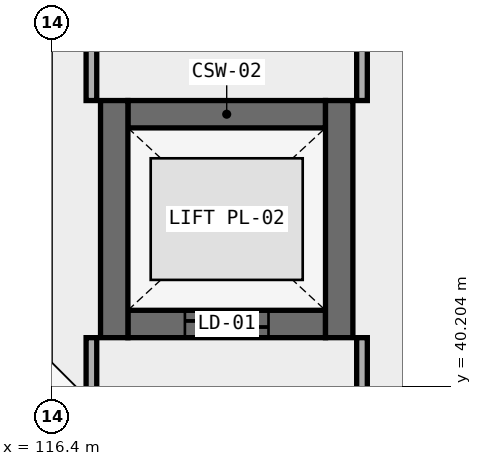
"""IFC4 building model, lengths in metres.
Left out: names, types, materials, properties, quantities, classifications, styles, units other than length and angle.
Written with IfcOpenShell. Run it as: python <this file> out.ifc"""

import sys

from ifc_helpers import new_model, si_unit, direction, frame, frame_2d, origin, place, context, subcontext, project, spatial, rectangle, extrude, element, fill, save


model = new_model("IFC4")
c1 = context("Model", 3, precision=1e-05, world=origin(), true_north=direction((0.0, 1.0)))
c2 = subcontext(c1, "Body", "Model", "MODEL_VIEW")
j1 = project(units=[si_unit("LENGTHUNIT", "METRE"), si_unit("PLANEANGLEUNIT", "RADIAN")], contexts=[c1])
p1 = place(None, origin())
s1 = spatial("IfcSite", under=j1, at=p1, CompositionType="ELEMENT")
p2 = place(p1, origin())
s2 = spatial("IfcBuilding", under=s1, at=p2, CompositionType="ELEMENT")
p3 = place(p2, frame((0.0, 0.0, 21.3)))
s3 = spatial("IfcBuildingStorey", under=s2, at=p3, CompositionType="ELEMENT", Elevation=21.3)
p4 = place(p3, frame((117.4, 43.78, 0.0), z_axis=(0.0, 0.0, 1.0), x_axis=(1.0, 0.0, 0.0)))
e1 = element("IfcWall", 1, at=p4, inside=s3, PredefinedType="SHEAR", context=c2, shape_type="SweptSolid", body=[
    extrude(rectangle(XDim=2.6, YDim=0.36, at=frame_2d((1.3, 0.0))), origin(), (0.0, 0.0, 1.0), 3.95),
])
p5 = place(p3, frame((117.4, 41.02, 0.0), z_axis=(0.0, 0.0, 1.0), x_axis=(1.0, 0.0, 0.0)))
e2 = element("IfcWall", 2, at=p5, inside=s3, PredefinedType="SHEAR", context=c2, shape_type="SweptSolid", body=[
    extrude(rectangle(XDim=2.6, YDim=0.36, at=frame_2d((1.3, 0.0))), origin(), (0.0, 0.0, 1.0), 3.95),
])
p6 = place(p5, frame((0.75, 0.0, 0.0)))
e3 = element("IfcOpeningElement", 3, at=p6, cuts=e2, PredefinedType="OPENING", context=c2, shape_type="SweptSolid", body=[
    extrude(rectangle(XDim=1.1, YDim=2.15, at=frame_2d((0.55, 1.075))), frame((0.0, 0.195, 0.0), z_axis=(0.0, -1.0, 0.0), x_axis=(1.0, 0.0, 0.0)), (0.0, 0.0, 1.0), 0.39),
])
for number, where, z_axis, x_axis in (
    (4, (117.22, 40.84, 0.0), (0.0, 0.0, 1.0), (0.0, 1.0, 0.0)),
    (5, (120.18, 40.84, 0.0), (0.0, 0.0, 1.0), (0.0, 1.0, 0.0)),
):
    element("IfcWall", number, at=place(p3, frame(where, z_axis=z_axis, x_axis=x_axis)), inside=s3, PredefinedType="SHEAR", context=c2, shape_type="SweptSolid", body=[
        extrude(rectangle(XDim=3.12, YDim=0.36, at=frame_2d((1.56, 0.0))), origin(), (0.0, 0.0, 1.0), 3.95),
    ])
p7 = place(p3, frame((116.92, 39.975, 0.0), z_axis=(0.0, 0.0, 1.0), x_axis=(0.0, 1.0, 0.0)))
e6 = element("IfcWall", 6, at=p7, inside=s3, PredefinedType="PARTITIONING", context=c2, shape_type="SweptSolid", body=[
    extrude(rectangle(XDim=0.865, YDim=0.14, at=frame_2d((0.433, 0.0))), origin(), (0.0, 0.0, 1.0), 2.83),
])
p8 = place(p3, frame((116.92, 43.96, 0.0), z_axis=(0.0, 0.0, 1.0), x_axis=(0.0, 1.0, 0.0)))
e7 = element("IfcWall", 7, at=p8, inside=s3, PredefinedType="PARTITIONING", context=c2, shape_type="SweptSolid", body=[
    extrude(rectangle(XDim=1.85, YDim=0.14, at=frame_2d((0.925, 0.0))), origin(), (0.0, 0.0, 1.0), 2.83),
])
p9 = place(p3, frame((120.48, 38.52, 0.0), z_axis=(0.0, 0.0, 1.0), x_axis=(0.0, 1.0, 0.0)))
e8 = element("IfcWall", 8, at=p9, inside=s3, PredefinedType="PARTITIONING", context=c2, shape_type="SweptSolid", body=[
    extrude(rectangle(XDim=2.32, YDim=0.14, at=frame_2d((1.16, 0.0))), origin(), (0.0, 0.0, 1.0), 2.83),
])
p10 = place(p3, frame((120.48, 43.96, 0.0), z_axis=(0.0, 0.0, 1.0), x_axis=(0.0, 1.0, 0.0)))
e9 = element("IfcWall", 9, at=p10, inside=s3, PredefinedType="PARTITIONING", context=c2, shape_type="SweptSolid", body=[
    extrude(rectangle(XDim=1.85, YDim=0.14, at=frame_2d((0.925, 0.0))), origin(), (0.0, 0.0, 1.0), 2.83),
])
p11 = place(p6, origin())
e10 = element("IfcDoor", 10, at=p11, inside=s3, OperationType="DOUBLE_DOOR_SLIDING", PredefinedType="DOOR", context=c2, shape_type="SweptSolid", body=[
    extrude(rectangle(XDim=1.1, YDim=2.15, at=frame_2d((0.55, 1.075))), frame((0.0, 0.025, 0.0), z_axis=(0.0, -1.0, 0.0), x_axis=(1.0, 0.0, 0.0)), (0.0, 0.0, 1.0), 0.05),
])
fill(e3, e10)
save(model, sys.argv[1])
